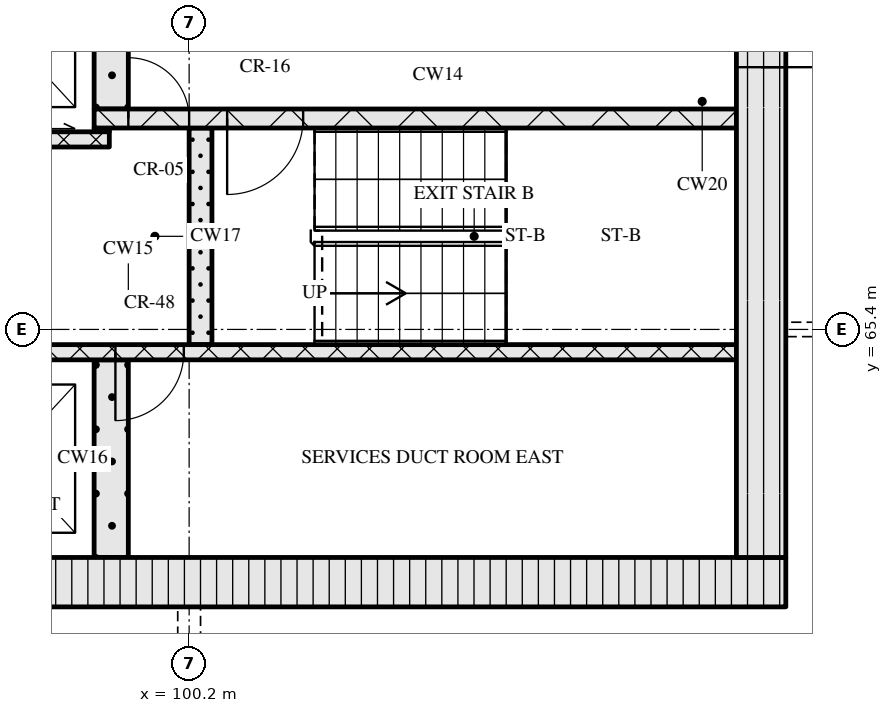
"""IFC4 building model, lengths in metres.
Left out: names, types, materials, properties, quantities, classifications, styles, units other than length and angle.
Written with IfcOpenShell. Run it as: python <this file> out.ifc"""

import sys

from ifc_helpers import new_model, si_unit, direction, frame, frame_2d, origin, place, context, subcontext, project, spatial, rectangle, extrude, element, fill, save


model = new_model("IFC4")
c1 = context("Model", 3, precision=1e-05, world=origin(), true_north=direction((0.0, 1.0)))
c2 = subcontext(c1, "Body", "Model", "MODEL_VIEW")
j1 = project(units=[si_unit("LENGTHUNIT", "METRE"), si_unit("PLANEANGLEUNIT", "RADIAN")], contexts=[c1])
p1 = place(None, origin())
s1 = spatial("IfcSite", under=j1, at=p1, CompositionType="ELEMENT")
p2 = place(p1, origin())
s2 = spatial("IfcBuilding", under=s1, at=p2, CompositionType="ELEMENT")
p3 = place(p2, frame((0.0, 0.0, 234.3)))
s3 = spatial("IfcBuildingStorey", under=s2, at=p3, CompositionType="ELEMENT", Elevation=234.3)
p4 = place(p3, frame((67.15, 62.075, 0.0), z_axis=(0.0, 0.0, 1.0), x_axis=(1.0, 0.0, 0.0)))
e1 = element("IfcWall", 1, at=p4, inside=s3, PredefinedType="SOLIDWALL", context=c2, shape_type="SweptSolid", body=[
    extrude(rectangle(XDim=40.9, YDim=0.65, at=frame_2d((20.45, 0.0))), origin(), (0.0, 0.0, 1.0), 3.32),
])
p5 = place(p4, frame((20.8, 0.0, 0.0)))
e2 = element("IfcOpeningElement", 2, at=p5, cuts=e1, PredefinedType="OPENING", context=c2, shape_type="SweptSolid", body=[
    extrude(rectangle(XDim=1.8, YDim=2.1, at=frame_2d((0.9, 1.05))), frame((0.0, 0.335, 0.0), z_axis=(0.0, -1.0, 0.0), x_axis=(1.0, 0.0, 0.0)), (0.0, 0.0, 1.0), 0.67),
])
p6 = place(p3, frame((107.725, 62.4, 0.0), z_axis=(0.0, 0.0, 1.0), x_axis=(0.0, 1.0, 0.0)))
e3 = element("IfcWall", 3, at=p6, inside=s3, PredefinedType="SOLIDWALL", context=c2, shape_type="SweptSolid", body=[
    extrude(rectangle(XDim=12.0, YDim=0.65, at=frame_2d((6.0, 0.0))), origin(), (0.0, 0.0, 1.0), 3.32),
])
p7 = place(p6, frame((6.45, 0.0, 0.0)))
e4 = element("IfcOpeningElement", 4, at=p7, cuts=e3, PredefinedType="OPENING", context=c2, shape_type="SweptSolid", body=[
    extrude(rectangle(XDim=1.2, YDim=2.1, at=frame_2d((0.6, 1.05))), frame((0.0, 0.335, 0.0), z_axis=(0.0, -1.0, 0.0), x_axis=(1.0, 0.0, 0.0)), (0.0, 0.0, 1.0), 0.67),
])
p8 = place(p3, frame((99.175, 62.4, 0.0), z_axis=(0.0, 0.0, 1.0), x_axis=(0.0, 1.0, 0.0)))
e5 = element("IfcWall", 5, at=p8, inside=s3, PredefinedType="SOLIDWALL", context=c2, shape_type="SweptSolid", body=[
    extrude(rectangle(XDim=2.6, YDim=0.45, at=frame_2d((1.3, 0.0))), origin(), (0.0, 0.0, 1.0), 3.32),
])
p9 = place(p3, frame((91.4, 65.1, 0.0), z_axis=(0.0, 0.0, 1.0), x_axis=(1.0, 0.0, 0.0)))
e6 = element("IfcWall", 6, at=p9, inside=s3, PredefinedType="SOLIDWALL", context=c2, shape_type="SweptSolid", body=[
    extrude(rectangle(XDim=16.0, YDim=0.2, at=frame_2d((8.0, 0.0))), origin(), (0.0, 0.0, 1.0), 3.32),
])
p10 = place(p9, frame((0.85, 0.0, 0.0)))
e7 = element("IfcOpeningElement", 7, at=p10, cuts=e6, PredefinedType="OPENING", context=c2, shape_type="SweptSolid", body=[
    extrude(rectangle(XDim=1.1, YDim=2.1, at=frame_2d((0.55, 1.05))), frame((0.0, 0.11, 0.0), z_axis=(0.0, -1.0, 0.0), x_axis=(1.0, 0.0, 0.0)), (0.0, 0.0, 1.0), 0.22),
])
p11 = place(p9, frame((3.35, 0.0, 0.0)))
e8 = element("IfcOpeningElement", 8, at=p11, cuts=e6, PredefinedType="OPENING", context=c2, shape_type="SweptSolid", body=[
    extrude(rectangle(XDim=1.1, YDim=2.1, at=frame_2d((0.55, 1.05))), frame((0.0, 0.11, 0.0), z_axis=(0.0, -1.0, 0.0), x_axis=(1.0, 0.0, 0.0)), (0.0, 0.0, 1.0), 0.22),
])
p12 = place(p9, frame((5.85, 0.0, 0.0)))
e9 = element("IfcOpeningElement", 9, at=p12, cuts=e6, PredefinedType="OPENING", context=c2, shape_type="SweptSolid", body=[
    extrude(rectangle(XDim=1.1, YDim=2.1, at=frame_2d((0.55, 1.05))), frame((0.0, 0.11, 0.0), z_axis=(0.0, -1.0, 0.0), x_axis=(1.0, 0.0, 0.0)), (0.0, 0.0, 1.0), 0.22),
])
p13 = place(p9, frame((7.83, 0.0, 0.0)))
e10 = element("IfcOpeningElement", 10, at=p13, cuts=e6, PredefinedType="OPENING", context=c2, shape_type="SweptSolid", body=[
    extrude(rectangle(XDim=0.9, YDim=2.1, at=frame_2d((0.45, 1.05))), frame((0.0, 0.11, 0.0), z_axis=(0.0, -1.0, 0.0), x_axis=(1.0, 0.0, 0.0)), (0.0, 0.0, 1.0), 0.22),
])
p14 = place(p3, frame((100.35, 65.2, 0.0), z_axis=(0.0, 0.0, 1.0), x_axis=(0.0, 1.0, 0.0)))
e11 = element("IfcWall", 11, at=p14, inside=s3, PredefinedType="SOLIDWALL", context=c2, shape_type="SweptSolid", body=[
    extrude(rectangle(XDim=2.85, YDim=0.3, at=frame_2d((1.425, 0.0))), origin(), (0.0, 0.0, 1.0), 3.32),
])
p15 = place(p3, frame((76.05, 67.9, 0.0), z_axis=(0.0, 0.0, 1.0), x_axis=(1.0, 0.0, 0.0)))
e12 = element("IfcWall", 12, at=p15, inside=s3, PredefinedType="SOLIDWALL", context=c2, shape_type="SweptSolid", body=[
    extrude(rectangle(XDim=23.1, YDim=0.2, at=frame_2d((11.55, 0.0))), origin(), (0.0, 0.0, 1.0), 3.32),
])
p16 = place(p15, frame((1.35, 0.0, 0.0)))
e13 = element("IfcOpeningElement", 13, at=p16, cuts=e12, PredefinedType="OPENING", context=c2, shape_type="SweptSolid", body=[
    extrude(rectangle(XDim=0.9, YDim=2.1, at=frame_2d((0.45, 1.05))), frame((0.0, 0.11, 0.0), z_axis=(0.0, -1.0, 0.0), x_axis=(1.0, 0.0, 0.0)), (0.0, 0.0, 1.0), 0.22),
])
p17 = place(p15, frame((5.06, 0.0, 0.0)))
e14 = element("IfcOpeningElement", 14, at=p17, cuts=e12, PredefinedType="OPENING", context=c2, shape_type="SweptSolid", body=[
    extrude(rectangle(XDim=0.9, YDim=2.1, at=frame_2d((0.45, 1.05))), frame((0.0, 0.11, 0.0), z_axis=(0.0, -1.0, 0.0), x_axis=(1.0, 0.0, 0.0)), (0.0, 0.0, 1.0), 0.22),
])
p18 = place(p15, frame((8.45, 0.0, 0.0)))
e15 = element("IfcOpeningElement", 15, at=p18, cuts=e12, PredefinedType="OPENING", context=c2, shape_type="SweptSolid", body=[
    extrude(rectangle(XDim=0.9, YDim=2.1, at=frame_2d((0.45, 1.05))), frame((0.0, 0.11, 0.0), z_axis=(0.0, -1.0, 0.0), x_axis=(1.0, 0.0, 0.0)), (0.0, 0.0, 1.0), 0.22),
])
p19 = place(p15, frame((10.91, 0.0, 0.0)))
e16 = element("IfcOpeningElement", 16, at=p19, cuts=e12, PredefinedType="OPENING", context=c2, shape_type="SweptSolid", body=[
    extrude(rectangle(XDim=0.9, YDim=2.1, at=frame_2d((0.45, 1.05))), frame((0.0, 0.11, 0.0), z_axis=(0.0, -1.0, 0.0), x_axis=(1.0, 0.0, 0.0)), (0.0, 0.0, 1.0), 0.22),
])
p20 = place(p15, frame((13.55, 0.0, 0.0)))
e17 = element("IfcOpeningElement", 17, at=p20, cuts=e12, PredefinedType="OPENING", context=c2, shape_type="SweptSolid", body=[
    extrude(rectangle(XDim=1.0, YDim=2.1, at=frame_2d((0.5, 1.05))), frame((0.0, 0.11, 0.0), z_axis=(0.0, -1.0, 0.0), x_axis=(1.0, 0.0, 0.0)), (0.0, 0.0, 1.0), 0.22),
])
p21 = place(p15, frame((16.2, 0.0, 0.0)))
e18 = element("IfcOpeningElement", 18, at=p21, cuts=e12, PredefinedType="OPENING", context=c2, shape_type="SweptSolid", body=[
    extrude(rectangle(XDim=1.1, YDim=2.1, at=frame_2d((0.55, 1.05))), frame((0.0, 0.11, 0.0), z_axis=(0.0, -1.0, 0.0), x_axis=(1.0, 0.0, 0.0)), (0.0, 0.0, 1.0), 0.22),
])
p22 = place(p15, frame((18.7, 0.0, 0.0)))
e19 = element("IfcOpeningElement", 19, at=p22, cuts=e12, PredefinedType="OPENING", context=c2, shape_type="SweptSolid", body=[
    extrude(rectangle(XDim=1.1, YDim=2.1, at=frame_2d((0.55, 1.05))), frame((0.0, 0.11, 0.0), z_axis=(0.0, -1.0, 0.0), x_axis=(1.0, 0.0, 0.0)), (0.0, 0.0, 1.0), 0.22),
])
p23 = place(p15, frame((21.2, 0.0, 0.0)))
e20 = element("IfcOpeningElement", 20, at=p23, cuts=e12, PredefinedType="OPENING", context=c2, shape_type="SweptSolid", body=[
    extrude(rectangle(XDim=1.1, YDim=2.1, at=frame_2d((0.55, 1.05))), frame((0.0, 0.11, 0.0), z_axis=(0.0, -1.0, 0.0), x_axis=(1.0, 0.0, 0.0)), (0.0, 0.0, 1.0), 0.22),
])
p24 = place(p3, frame((98.95, 68.025, 0.0), z_axis=(0.0, 0.0, 1.0), x_axis=(1.0, 0.0, 0.0)))
e21 = element("IfcWall", 21, at=p24, inside=s3, PredefinedType="SOLIDWALL", context=c2, shape_type="SweptSolid", body=[
    extrude(rectangle(XDim=0.2, YDim=0.05, at=frame_2d((0.1, 0.0))), origin(), (0.0, 0.0, 1.0), 3.32),
])
p25 = place(p3, frame((98.95, 68.175, 0.0), z_axis=(0.0, 0.0, 1.0), x_axis=(1.0, 0.0, 0.0)))
e22 = element("IfcWall", 22, at=p25, inside=s3, PredefinedType="SOLIDWALL", context=c2, shape_type="SweptSolid", body=[
    extrude(rectangle(XDim=8.45, YDim=0.25, at=frame_2d((4.225, 0.0))), origin(), (0.0, 0.0, 1.0), 3.32),
])
p26 = place(p25, frame((0.45, 0.0, 0.0)))
e23 = element("IfcOpeningElement", 23, at=p26, cuts=e22, PredefinedType="OPENING", context=c2, shape_type="SweptSolid", body=[
    extrude(rectangle(XDim=0.8, YDim=2.1, at=frame_2d((0.4, 1.05))), frame((0.0, 0.135, 0.0), z_axis=(0.0, -1.0, 0.0), x_axis=(1.0, 0.0, 0.0)), (0.0, 0.0, 1.0), 0.27),
])
p27 = place(p25, frame((1.75, 0.0, 0.0)))
e24 = element("IfcOpeningElement", 24, at=p27, cuts=e22, PredefinedType="OPENING", context=c2, shape_type="SweptSolid", body=[
    extrude(rectangle(XDim=1.0, YDim=2.1, at=frame_2d((0.5, 1.05))), frame((0.0, 0.135, 0.0), z_axis=(0.0, -1.0, 0.0), x_axis=(1.0, 0.0, 0.0)), (0.0, 0.0, 1.0), 0.27),
])
p28 = place(p3, frame((99.175, 68.3, 0.0), z_axis=(0.0, 0.0, 1.0), x_axis=(0.0, 1.0, 0.0)))
e25 = element("IfcWall", 25, at=p28, inside=s3, PredefinedType="SOLIDWALL", context=c2, shape_type="SweptSolid", body=[
    extrude(rectangle(XDim=2.3, YDim=0.45, at=frame_2d((1.15, 0.0))), origin(), (0.0, 0.0, 1.0), 3.32),
])
p29 = place(p13, origin())
e26 = element("IfcDoor", 26, at=p29, inside=s3, OperationType="SINGLE_SWING_RIGHT", PredefinedType="DOOR", context=c2, shape_type="SweptSolid", body=[
    extrude(rectangle(XDim=0.9, YDim=2.1, at=frame_2d((0.45, 1.05))), frame((0.0, 0.025, 0.0), z_axis=(0.0, -1.0, 0.0), x_axis=(1.0, 0.0, 0.0)), (0.0, 0.0, 1.0), 0.05),
])
fill(e10, e26)
p30 = place(p26, origin())
e27 = element("IfcDoor", 27, at=p30, inside=s3, OperationType="SINGLE_SWING_LEFT", PredefinedType="DOOR", context=c2, shape_type="SweptSolid", body=[
    extrude(rectangle(XDim=0.8, YDim=2.1, at=frame_2d((0.4, 1.05))), frame((0.0, 0.025, 0.0), z_axis=(0.0, -1.0, 0.0), x_axis=(1.0, 0.0, 0.0)), (0.0, 0.0, 1.0), 0.05),
])
fill(e23, e27)
p31 = place(p27, origin())
e28 = element("IfcDoor", 28, at=p31, inside=s3, OperationType="SINGLE_SWING_RIGHT", PredefinedType="DOOR", context=c2, shape_type="SweptSolid", body=[
    extrude(rectangle(XDim=1.0, YDim=2.1, at=frame_2d((0.5, 1.05))), frame((0.0, 0.025, 0.0), z_axis=(0.0, -1.0, 0.0), x_axis=(1.0, 0.0, 0.0)), (0.0, 0.0, 1.0), 0.05),
])
fill(e24, e28)
p32 = place(p7, origin())
e29 = element("IfcDoor", 29, at=p32, inside=s3, OperationType="SINGLE_SWING_RIGHT", PredefinedType="DOOR", context=c2, shape_type="SweptSolid", body=[
    extrude(rectangle(XDim=1.2, YDim=2.1, at=frame_2d((0.6, 1.05))), frame((0.0, 0.025, 0.0), z_axis=(0.0, -1.0, 0.0), x_axis=(1.0, 0.0, 0.0)), (0.0, 0.0, 1.0), 0.05),
])
fill(e4, e29)
save(model, sys.argv[1])
